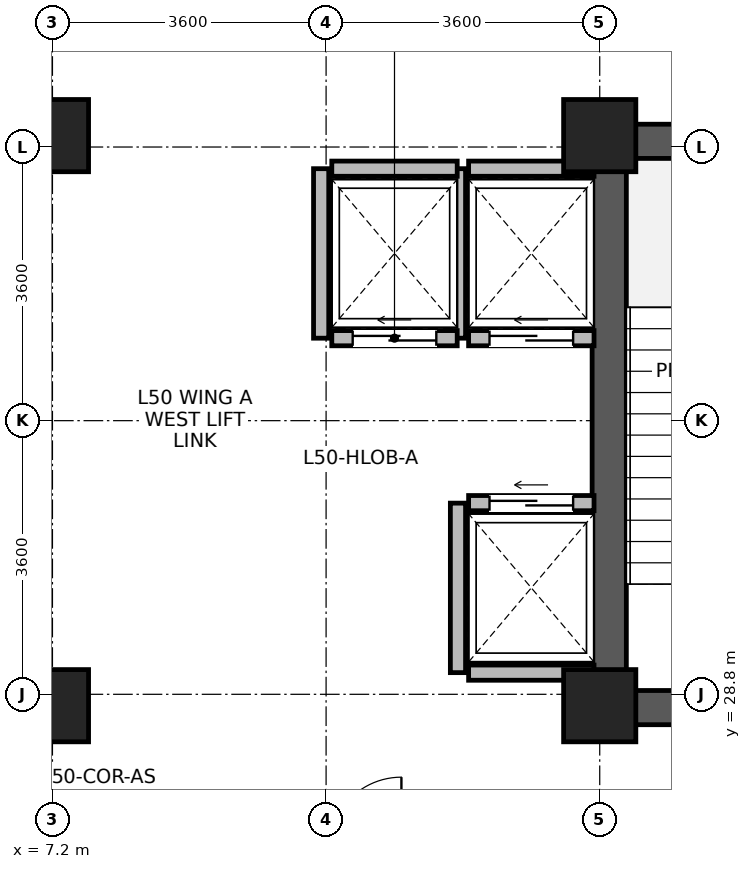
"""IFC4 building model, lengths in metres.
Left out: names, types, materials, properties, quantities, classifications, styles, units other than length and angle.
Written with IfcOpenShell. Run it as: python <this file> out.ifc"""

import sys

from ifc_helpers import new_model, si_unit, direction, frame, frame_2d, origin, origin_2d, place, context, subcontext, project, spatial, rectangle, extrude, source, transform, mapped, element, fill, save


model = new_model("IFC4")
c1 = context("Model", 3, precision=1e-05, world=origin(), true_north=direction((0.0, 1.0)))
c2 = subcontext(c1, "Body", "Model", "MODEL_VIEW")
j1 = project(units=[si_unit("LENGTHUNIT", "METRE"), si_unit("PLANEANGLEUNIT", "RADIAN")], contexts=[c1])
p1 = place(None, origin())
s1 = spatial("IfcSite", under=j1, at=p1, CompositionType="ELEMENT")
p2 = place(p1, origin())
s2 = spatial("IfcBuilding", under=s1, at=p2, CompositionType="ELEMENT")
p3 = place(p2, frame((0.0, 0.0, 197.2)))
s3 = spatial("IfcBuildingStorey", under=s2, at=p3, CompositionType="ELEMENT", Elevation=197.2)
p4 = place(p3, frame((14.525, 28.4, 0.0), z_axis=(0.0, 0.0, 1.0), x_axis=(0.0, 1.0, 0.0)))
e1 = element("IfcWall", 1, at=p4, inside=s3, PredefinedType="SHEAR", context=c2, shape_type="SweptSolid", body=[
    extrude(rectangle(XDim=7.9, YDim=0.45, at=frame_2d((3.95, 0.0))), origin(), (0.0, 0.0, 1.0), 4.37),
])
for number, where, z_axis, x_axis in (
    (2, (14.75, 28.625, 0.0), (0.0, 0.0, 1.0), (1.0, 0.0, 0.0)),
    (3, (14.75, 36.075, 0.0), (0.0, 0.0, 1.0), (1.0, 0.0, 0.0)),
):
    element("IfcWall", number, at=place(p3, frame(where, z_axis=z_axis, x_axis=x_axis)), inside=s3, PredefinedType="SHEAR", context=c2, shape_type="SweptSolid", body=[
        extrude(rectangle(XDim=3.2, YDim=0.45, at=frame_2d((1.6, 0.0))), origin(), (0.0, 0.0, 1.0), 4.37),
    ])
m1 = source(origin(), c2, "Body", "SweptSolid", [
    extrude(rectangle(XDim=0.95, YDim=0.95, at=origin_2d()), origin(), (0.0, 0.0, 1.0), 4.6),
])
for number, where, z_axis, x_axis in (
    (4, (7.2, 28.65, 0.0), (0.0, 0.0, 1.0), (1.0, 0.0, 0.0)),
    (5, (7.2, 36.15, 0.0), (0.0, 0.0, 1.0), (1.0, 0.0, 0.0)),
    (6, (14.4, 28.65, 0.0), (0.0, 0.0, 1.0), (1.0, 0.0, 0.0)),
    (7, (14.4, 36.15, 0.0), (0.0, 0.0, 1.0), (1.0, 0.0, 0.0)),
):
    element("IfcColumn", number, at=place(p3, frame(where, z_axis=z_axis, x_axis=x_axis)), inside=s3, PredefinedType="COLUMN", context=c2, shape_type="MappedRepresentation", body=[
        mapped(m1, transform((0.0, 0.0, 0.0), x_axis=(1.0, 0.0, 0.0), y_axis=(0.0, 1.0, 0.0), z_axis=(0.0, 0.0, 1.0), scale=1.0)),
    ])
p5 = place(p3, frame((12.675, 33.485, 0.0), z_axis=(0.0, 0.0, 1.0), x_axis=(1.0, 0.0, 0.0)))
e8 = element("IfcWall", 8, at=p5, inside=s3, PredefinedType="PARTITIONING", context=c2, shape_type="SweptSolid", body=[
    extrude(rectangle(XDim=1.65, YDim=0.2, at=frame_2d((0.825, 0.0))), origin(), (0.0, 0.0, 1.0), 4.35),
])
p6 = place(p5, frame((0.275, 0.0, 0.0)))
e9 = element("IfcOpeningElement", 9, at=p6, cuts=e8, PredefinedType="OPENING", context=c2, shape_type="SweptSolid", body=[
    extrude(rectangle(XDim=1.1, YDim=2.12, at=frame_2d((0.55, 1.06))), frame((0.0, 0.11, 0.0), z_axis=(0.0, -1.0, 0.0), x_axis=(1.0, 0.0, 0.0)), (0.0, 0.0, 1.0), 0.22),
])
p7 = place(p3, frame((12.675, 35.715, 0.0), z_axis=(0.0, 0.0, 1.0), x_axis=(1.0, 0.0, 0.0)))
e10 = element("IfcWall", 10, at=p7, inside=s3, PredefinedType="PARTITIONING", context=c2, shape_type="SweptSolid", body=[
    extrude(rectangle(XDim=1.65, YDim=0.2, at=frame_2d((0.825, 0.0))), origin(), (0.0, 0.0, 1.0), 4.35),
])
p8 = place(p3, frame((12.535, 33.485, 0.0), z_axis=(0.0, 0.0, 1.0), x_axis=(0.0, 1.0, 0.0)))
e11 = element("IfcWall", 11, at=p8, inside=s3, PredefinedType="PARTITIONING", context=c2, shape_type="SweptSolid", body=[
    extrude(rectangle(XDim=2.23, YDim=0.2, at=frame_2d((1.115, 0.0))), origin(), (0.0, 0.0, 1.0), 4.35),
])
p9 = place(p3, frame((12.675, 29.085, 0.0), z_axis=(0.0, 0.0, 1.0), x_axis=(1.0, 0.0, 0.0)))
e12 = element("IfcWall", 12, at=p9, inside=s3, PredefinedType="PARTITIONING", context=c2, shape_type="SweptSolid", body=[
    extrude(rectangle(XDim=1.65, YDim=0.2, at=frame_2d((0.825, 0.0))), origin(), (0.0, 0.0, 1.0), 4.35),
])
p10 = place(p3, frame((12.675, 31.315, 0.0), z_axis=(0.0, 0.0, 1.0), x_axis=(1.0, 0.0, 0.0)))
e13 = element("IfcWall", 13, at=p10, inside=s3, PredefinedType="PARTITIONING", context=c2, shape_type="SweptSolid", body=[
    extrude(rectangle(XDim=1.65, YDim=0.2, at=frame_2d((0.825, 0.0))), origin(), (0.0, 0.0, 1.0), 4.35),
])
p11 = place(p10, frame((0.275, 0.0, 0.0)))
e14 = element("IfcOpeningElement", 14, at=p11, cuts=e13, PredefinedType="OPENING", context=c2, shape_type="SweptSolid", body=[
    extrude(rectangle(XDim=1.1, YDim=2.12, at=frame_2d((0.55, 1.06))), frame((0.0, 0.11, 0.0), z_axis=(0.0, -1.0, 0.0), x_axis=(1.0, 0.0, 0.0)), (0.0, 0.0, 1.0), 0.22),
])
p12 = place(p3, frame((12.535, 29.085, 0.0), z_axis=(0.0, 0.0, 1.0), x_axis=(0.0, 1.0, 0.0)))
e15 = element("IfcWall", 15, at=p12, inside=s3, PredefinedType="PARTITIONING", context=c2, shape_type="SweptSolid", body=[
    extrude(rectangle(XDim=2.23, YDim=0.2, at=frame_2d((1.115, 0.0))), origin(), (0.0, 0.0, 1.0), 4.35),
])
p13 = place(p3, frame((10.875, 33.485, 0.0), z_axis=(0.0, 0.0, 1.0), x_axis=(1.0, 0.0, 0.0)))
e16 = element("IfcWall", 16, at=p13, inside=s3, PredefinedType="PARTITIONING", context=c2, shape_type="SweptSolid", body=[
    extrude(rectangle(XDim=1.65, YDim=0.2, at=frame_2d((0.825, 0.0))), origin(), (0.0, 0.0, 1.0), 4.35),
])
p14 = place(p13, frame((0.275, 0.0, 0.0)))
e17 = element("IfcOpeningElement", 17, at=p14, cuts=e16, PredefinedType="OPENING", context=c2, shape_type="SweptSolid", body=[
    extrude(rectangle(XDim=1.1, YDim=2.12, at=frame_2d((0.55, 1.06))), frame((0.0, 0.11, 0.0), z_axis=(0.0, -1.0, 0.0), x_axis=(1.0, 0.0, 0.0)), (0.0, 0.0, 1.0), 0.22),
])
p15 = place(p3, frame((10.875, 35.715, 0.0), z_axis=(0.0, 0.0, 1.0), x_axis=(1.0, 0.0, 0.0)))
e18 = element("IfcWall", 18, at=p15, inside=s3, PredefinedType="PARTITIONING", context=c2, shape_type="SweptSolid", body=[
    extrude(rectangle(XDim=1.65, YDim=0.2, at=frame_2d((0.825, 0.0))), origin(), (0.0, 0.0, 1.0), 4.35),
])
p16 = place(p3, frame((10.735, 33.485, 0.0), z_axis=(0.0, 0.0, 1.0), x_axis=(0.0, 1.0, 0.0)))
e19 = element("IfcWall", 19, at=p16, inside=s3, PredefinedType="PARTITIONING", context=c2, shape_type="SweptSolid", body=[
    extrude(rectangle(XDim=2.23, YDim=0.2, at=frame_2d((1.115, 0.0))), origin(), (0.0, 0.0, 1.0), 4.35),
])
p17 = place(p6, origin())
e20 = element("IfcDoor", 20, at=p17, inside=s3, OperationType="SLIDING_TO_LEFT", PredefinedType="DOOR", context=c2, shape_type="SweptSolid", body=[
    extrude(rectangle(XDim=1.1, YDim=2.12, at=frame_2d((0.55, 1.06))), frame((0.0, 0.025, 0.0), z_axis=(0.0, -1.0, 0.0), x_axis=(1.0, 0.0, 0.0)), (0.0, 0.0, 1.0), 0.05),
])
fill(e9, e20)
p18 = place(p11, origin())
e21 = element("IfcDoor", 21, at=p18, inside=s3, OperationType="SLIDING_TO_LEFT", PredefinedType="DOOR", context=c2, shape_type="SweptSolid", body=[
    extrude(rectangle(XDim=1.1, YDim=2.12, at=frame_2d((0.55, 1.06))), frame((0.0, 0.025, 0.0), z_axis=(0.0, -1.0, 0.0), x_axis=(1.0, 0.0, 0.0)), (0.0, 0.0, 1.0), 0.05),
])
fill(e14, e21)
p19 = place(p14, origin())
e22 = element("IfcDoor", 22, at=p19, inside=s3, OperationType="SLIDING_TO_LEFT", PredefinedType="DOOR", context=c2, shape_type="SweptSolid", body=[
    extrude(rectangle(XDim=1.1, YDim=2.12, at=frame_2d((0.55, 1.06))), frame((0.0, 0.025, 0.0), z_axis=(0.0, -1.0, 0.0), x_axis=(1.0, 0.0, 0.0)), (0.0, 0.0, 1.0), 0.05),
])
fill(e17, e22)
save(model, sys.argv[1])
